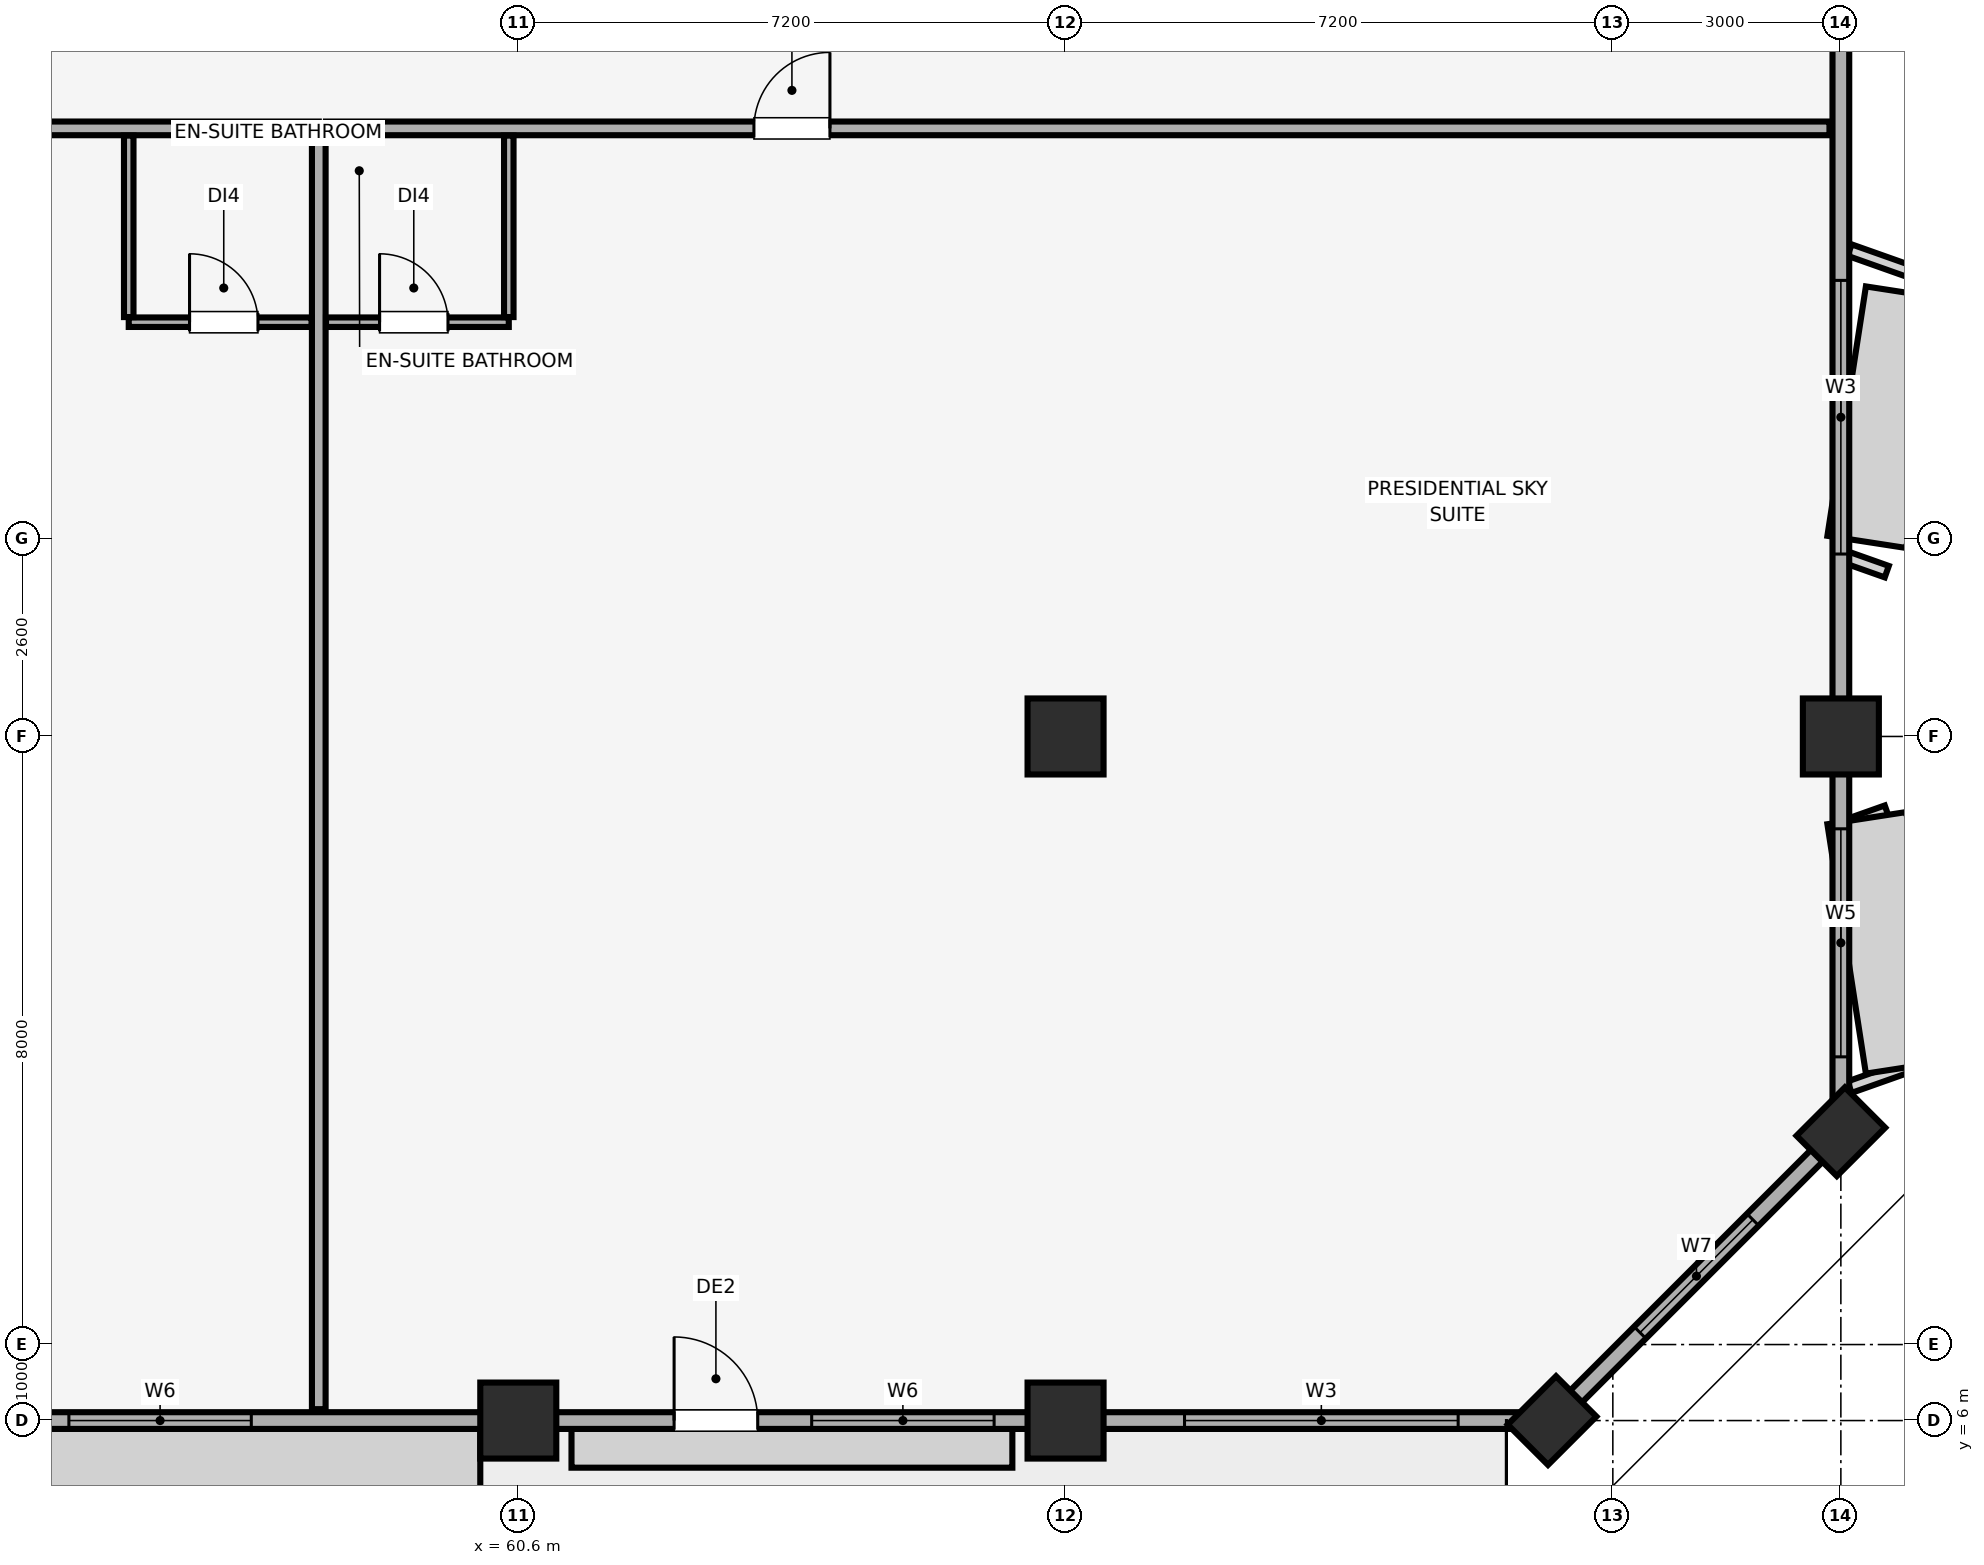
"""IFC4 building model, lengths in metres.
Left out: names, types, materials, properties, quantities, classifications, styles, units other than length and angle.
Written with IfcOpenShell. Run it as: python <this file> out.ifc"""

import sys

from ifc_helpers import new_model, si_unit, direction, frame, frame_2d, origin, origin_2d, place, context, subcontext, project, spatial, rectangle, extrude, element, fill, save


model = new_model("IFC4")
c1 = context("Model", 3, precision=1e-05, world=origin(), true_north=direction((0.0, 1.0)))
c2 = subcontext(c1, "Body", "Model", "MODEL_VIEW")
j1 = project(units=[si_unit("LENGTHUNIT", "METRE"), si_unit("PLANEANGLEUNIT", "RADIAN")], contexts=[c1])
p1 = place(None, origin())
s1 = spatial("IfcSite", under=j1, at=p1, CompositionType="ELEMENT")
p2 = place(p1, origin())
s2 = spatial("IfcBuilding", under=s1, at=p2, CompositionType="ELEMENT")
p3 = place(p2, frame((0.0, 0.0, 276.55)))
s3 = spatial("IfcBuildingStorey", under=s2, at=p3, CompositionType="ELEMENT", Elevation=276.55)
for number, where, z_axis, x_axis in (
    (1, (60.6, 6.0, 0.0), (0.0, 0.0, 1.0), (1.0, 0.0, 0.0)),
    (2, (67.8, 6.0, 0.0), (0.0, 0.0, 1.0), (1.0, 0.0, 0.0)),
    (3, (78.0, 15.0, 0.0), (0.0, 0.0, 1.0), (1.0, 0.0, 0.0)),
):
    element("IfcColumn", number, at=place(p3, frame(where, z_axis=z_axis, x_axis=x_axis)), inside=s3, PredefinedType="COLUMN", context=c2, shape_type="SweptSolid", body=[
        extrude(rectangle(XDim=1.0, YDim=1.0, at=origin_2d()), origin(), (0.0, 0.0, 1.0), 3.6),
    ])
for number, where, z_axis, x_axis in (
    (4, (74.2, 6.0, 0.0), (0.0, 0.0, 1.0), (0.707, 0.707, 0.0)),
    (5, (78.0, 9.8, 0.0), (0.0, 0.0, 1.0), (0.707, 0.707, 0.0)),
):
    element("IfcColumn", number, at=place(p3, frame(where, z_axis=z_axis, x_axis=x_axis)), inside=s3, PredefinedType="PILASTER", context=c2, shape_type="SweptSolid", body=[
        extrude(rectangle(XDim=0.9, YDim=0.75, at=origin_2d()), origin(), (0.0, 0.0, 1.0), 3.6),
    ])
p4 = place(p3, frame((67.8, 15.0, 0.0), z_axis=(0.0, 0.0, 1.0), x_axis=(1.0, 0.0, 0.0)))
e6 = element("IfcColumn", 6, at=p4, inside=s3, PredefinedType="COLUMN", context=c2, shape_type="SweptSolid", body=[
    extrude(rectangle(XDim=1.0, YDim=1.0, at=origin_2d()), origin(), (0.0, 0.0, 1.0), 3.6),
])
p5 = place(p3, frame((9.8, 6.0, 0.0), z_axis=(0.0, 0.0, 1.0), x_axis=(1.0, 0.0, 0.0)))
e7 = element("IfcWall", 7, at=p5, inside=s3, PredefinedType="SOLIDWALL", context=c2, shape_type="SweptSolid", body=[
    extrude(rectangle(XDim=64.4, YDim=0.22, at=frame_2d((32.2, 0.0))), origin(), (0.0, 0.0, 1.0), 2.8),
])
p6 = place(p5, frame((10.45, 0.0, 0.0)))
e8 = element("IfcOpeningElement", 8, at=p6, cuts=e7, PredefinedType="OPENING", context=c2, shape_type="SweptSolid", body=[
    extrude(rectangle(XDim=1.1, YDim=2.15, at=frame_2d((0.55, 1.075))), frame((0.0, 0.12, 0.0), z_axis=(0.0, -1.0, 0.0), x_axis=(1.0, 0.0, 0.0)), (0.0, 0.0, 1.0), 0.24),
])
p7 = place(p5, frame((24.45, 0.0, 0.0)))
e9 = element("IfcOpeningElement", 9, at=p7, cuts=e7, PredefinedType="OPENING", context=c2, shape_type="SweptSolid", body=[
    extrude(rectangle(XDim=1.1, YDim=2.15, at=frame_2d((0.55, 1.075))), frame((0.0, 0.12, 0.0), z_axis=(0.0, -1.0, 0.0), x_axis=(1.0, 0.0, 0.0)), (0.0, 0.0, 1.0), 0.24),
])
p8 = place(p5, frame((52.85, 0.0, 0.0)))
e10 = element("IfcOpeningElement", 10, at=p8, cuts=e7, PredefinedType="OPENING", context=c2, shape_type="SweptSolid", body=[
    extrude(rectangle(XDim=1.1, YDim=2.15, at=frame_2d((0.55, 1.075))), frame((0.0, 0.12, 0.0), z_axis=(0.0, -1.0, 0.0), x_axis=(1.0, 0.0, 0.0)), (0.0, 0.0, 1.0), 0.24),
])
p9 = place(p5, frame((1.235, 0.0, 0.85)))
e11 = element("IfcOpeningElement", 11, at=p9, cuts=e7, PredefinedType="OPENING", context=c2, shape_type="SweptSolid", body=[
    extrude(rectangle(XDim=3.6, YDim=1.75, at=frame_2d((1.8, 0.875))), frame((0.0, 0.12, 0.0), z_axis=(0.0, -1.0, 0.0), x_axis=(1.0, 0.0, 0.0)), (0.0, 0.0, 1.0), 0.24),
])
p10 = place(p5, frame((7.34, 0.0, 0.85)))
e12 = element("IfcOpeningElement", 12, at=p10, cuts=e7, PredefinedType="OPENING", context=c2, shape_type="SweptSolid", body=[
    extrude(rectangle(XDim=2.4, YDim=1.5, at=frame_2d((1.2, 0.75))), frame((0.0, 0.12, 0.0), z_axis=(0.0, -1.0, 0.0), x_axis=(1.0, 0.0, 0.0)), (0.0, 0.0, 1.0), 0.24),
])
p11 = place(p5, frame((17.113, 0.0, 0.85)))
e13 = element("IfcOpeningElement", 13, at=p11, cuts=e7, PredefinedType="OPENING", context=c2, shape_type="SweptSolid", body=[
    extrude(rectangle(XDim=2.4, YDim=1.5, at=frame_2d((1.2, 0.75))), frame((0.0, 0.12, 0.0), z_axis=(0.0, -1.0, 0.0), x_axis=(1.0, 0.0, 0.0)), (0.0, 0.0, 1.0), 0.24),
])
p12 = place(p5, frame((21.99, 0.0, 0.85)))
e14 = element("IfcOpeningElement", 14, at=p12, cuts=e7, PredefinedType="OPENING", context=c2, shape_type="SweptSolid", body=[
    extrude(rectangle(XDim=1.5, YDim=1.4, at=frame_2d((0.75, 0.7))), frame((0.0, 0.12, 0.0), z_axis=(0.0, -1.0, 0.0), x_axis=(1.0, 0.0, 0.0)), (0.0, 0.0, 1.0), 0.24),
])
p13 = place(p5, frame((29.1, 0.0, 0.85)))
e15 = element("IfcOpeningElement", 15, at=p13, cuts=e7, PredefinedType="OPENING", context=c2, shape_type="SweptSolid", body=[
    extrude(rectangle(XDim=2.4, YDim=1.5, at=frame_2d((1.2, 0.75))), frame((0.0, 0.12, 0.0), z_axis=(0.0, -1.0, 0.0), x_axis=(1.0, 0.0, 0.0)), (0.0, 0.0, 1.0), 0.24),
])
p14 = place(p5, frame((32.9, 0.0, 0.85)))
e16 = element("IfcOpeningElement", 16, at=p14, cuts=e7, PredefinedType="OPENING", context=c2, shape_type="SweptSolid", body=[
    extrude(rectangle(XDim=2.4, YDim=1.5, at=frame_2d((1.2, 0.75))), frame((0.0, 0.12, 0.0), z_axis=(0.0, -1.0, 0.0), x_axis=(1.0, 0.0, 0.0)), (0.0, 0.0, 1.0), 0.24),
])
p15 = place(p5, frame((38.2, 0.0, 0.85)))
e17 = element("IfcOpeningElement", 17, at=p15, cuts=e7, PredefinedType="OPENING", context=c2, shape_type="SweptSolid", body=[
    extrude(rectangle(XDim=3.6, YDim=1.75, at=frame_2d((1.8, 0.875))), frame((0.0, 0.12, 0.0), z_axis=(0.0, -1.0, 0.0), x_axis=(1.0, 0.0, 0.0)), (0.0, 0.0, 1.0), 0.24),
])
p16 = place(p5, frame((44.887, 0.0, 0.85)))
e18 = element("IfcOpeningElement", 18, at=p16, cuts=e7, PredefinedType="OPENING", context=c2, shape_type="SweptSolid", body=[
    extrude(rectangle(XDim=2.4, YDim=1.5, at=frame_2d((1.2, 0.75))), frame((0.0, 0.12, 0.0), z_axis=(0.0, -1.0, 0.0), x_axis=(1.0, 0.0, 0.0)), (0.0, 0.0, 1.0), 0.24),
])
p17 = place(p5, frame((54.66, 0.0, 0.85)))
e19 = element("IfcOpeningElement", 19, at=p17, cuts=e7, PredefinedType="OPENING", context=c2, shape_type="SweptSolid", body=[
    extrude(rectangle(XDim=2.4, YDim=1.5, at=frame_2d((1.2, 0.75))), frame((0.0, 0.12, 0.0), z_axis=(0.0, -1.0, 0.0), x_axis=(1.0, 0.0, 0.0)), (0.0, 0.0, 1.0), 0.24),
])
p18 = place(p5, frame((59.565, 0.0, 0.85)))
e20 = element("IfcOpeningElement", 20, at=p18, cuts=e7, PredefinedType="OPENING", context=c2, shape_type="SweptSolid", body=[
    extrude(rectangle(XDim=3.6, YDim=1.75, at=frame_2d((1.8, 0.875))), frame((0.0, 0.12, 0.0), z_axis=(0.0, -1.0, 0.0), x_axis=(1.0, 0.0, 0.0)), (0.0, 0.0, 1.0), 0.24),
])
p19 = place(p3, frame((74.2, 6.0, 0.0), z_axis=(0.0, 0.0, 1.0), x_axis=(0.707106781187, 0.707106781187, 0.0)))
e21 = element("IfcWall", 21, at=p19, inside=s3, PredefinedType="SOLIDWALL", context=c2, shape_type="SweptSolid", body=[
    extrude(rectangle(XDim=5.374, YDim=0.22, at=frame_2d((2.687, 0.0))), origin(), (0.0, 0.0, 1.0), 2.8),
])
p20 = place(p19, frame((1.637, 0.0, 0.85)))
e22 = element("IfcOpeningElement", 22, at=p20, cuts=e21, PredefinedType="OPENING", context=c2, shape_type="SweptSolid", body=[
    extrude(rectangle(XDim=2.1, YDim=1.6, at=frame_2d((1.05, 0.8))), frame((0.0, 0.12, 0.0), z_axis=(0.0, -1.0, 0.0), x_axis=(1.0, 0.0, 0.0)), (0.0, 0.0, 1.0), 0.24),
])
p21 = place(p3, frame((78.0, 9.8, 0.0), z_axis=(0.0, 0.0, 1.0), x_axis=(0.0, 1.0, 0.0)))
e23 = element("IfcWall", 23, at=p21, inside=s3, PredefinedType="SOLIDWALL", context=c2, shape_type="SweptSolid", body=[
    extrude(rectangle(XDim=35.4, YDim=0.22, at=frame_2d((17.7, 0.0))), origin(), (0.0, 0.0, 1.0), 2.8),
])
p22 = place(p21, frame((0.985, 0.0, 0.85)))
e24 = element("IfcOpeningElement", 24, at=p22, cuts=e23, PredefinedType="OPENING", context=c2, shape_type="SweptSolid", body=[
    extrude(rectangle(XDim=3.0, YDim=1.5, at=frame_2d((1.5, 0.75))), frame((0.0, 0.12, 0.0), z_axis=(0.0, -1.0, 0.0), x_axis=(1.0, 0.0, 0.0)), (0.0, 0.0, 1.0), 0.24),
])
p23 = place(p21, frame((7.6, 0.0, 0.85)))
e25 = element("IfcOpeningElement", 25, at=p23, cuts=e23, PredefinedType="OPENING", context=c2, shape_type="SweptSolid", body=[
    extrude(rectangle(XDim=3.6, YDim=1.65, at=frame_2d((1.8, 0.825))), frame((0.0, 0.12, 0.0), z_axis=(0.0, -1.0, 0.0), x_axis=(1.0, 0.0, 0.0)), (0.0, 0.0, 1.0), 0.24),
])
p24 = place(p21, frame((16.0, 0.0, 0.85)))
e26 = element("IfcOpeningElement", 26, at=p24, cuts=e23, PredefinedType="OPENING", context=c2, shape_type="SweptSolid", body=[
    extrude(rectangle(XDim=2.4, YDim=1.5, at=frame_2d((1.2, 0.75))), frame((0.0, 0.12, 0.0), z_axis=(0.0, -1.0, 0.0), x_axis=(1.0, 0.0, 0.0)), (0.0, 0.0, 1.0), 0.24),
])
p25 = place(p21, frame((20.815, 0.0, 0.85)))
e27 = element("IfcOpeningElement", 27, at=p25, cuts=e23, PredefinedType="OPENING", context=c2, shape_type="SweptSolid", body=[
    extrude(rectangle(XDim=3.0, YDim=1.5, at=frame_2d((1.5, 0.75))), frame((0.0, 0.12, 0.0), z_axis=(0.0, -1.0, 0.0), x_axis=(1.0, 0.0, 0.0)), (0.0, 0.0, 1.0), 0.24),
])
p26 = place(p21, frame((25.585, 0.0, 0.85)))
e28 = element("IfcOpeningElement", 28, at=p26, cuts=e23, PredefinedType="OPENING", context=c2, shape_type="SweptSolid", body=[
    extrude(rectangle(XDim=3.0, YDim=1.5, at=frame_2d((1.5, 0.75))), frame((0.0, 0.12, 0.0), z_axis=(0.0, -1.0, 0.0), x_axis=(1.0, 0.0, 0.0)), (0.0, 0.0, 1.0), 0.24),
])
p27 = place(p21, frame((30.915, 0.0, 0.85)))
e29 = element("IfcOpeningElement", 29, at=p27, cuts=e23, PredefinedType="OPENING", context=c2, shape_type="SweptSolid", body=[
    extrude(rectangle(XDim=3.6, YDim=1.65, at=frame_2d((1.8, 0.825))), frame((0.0, 0.12, 0.0), z_axis=(0.0, -1.0, 0.0), x_axis=(1.0, 0.0, 0.0)), (0.0, 0.0, 1.0), 0.24),
])
p28 = place(p3, frame((42.095, 23.0, 0.0), z_axis=(0.0, 0.0, 1.0), x_axis=(1.0, 0.0, 0.0)))
e30 = element("IfcWall", 30, at=p28, inside=s3, PredefinedType="PARTITIONING", context=c2, shape_type="SweptSolid", body=[
    extrude(rectangle(XDim=15.88, YDim=0.18, at=frame_2d((7.94, 0.0))), origin(), (0.0, 0.0, 1.0), 3.6),
])
p29 = place(p28, frame((7.205, 0.0, 0.0)))
e31 = element("IfcOpeningElement", 31, at=p29, cuts=e30, PredefinedType="OPENING", context=c2, shape_type="SweptSolid", body=[
    extrude(rectangle(XDim=1.0, YDim=2.15, at=frame_2d((0.5, 1.075))), frame((0.0, 0.1, 0.0), z_axis=(0.0, -1.0, 0.0), x_axis=(1.0, 0.0, 0.0)), (0.0, 0.0, 1.0), 0.2),
])
p30 = place(p3, frame((57.975, 6.15, 0.0), z_axis=(0.0, 0.0, 1.0), x_axis=(0.0, 1.0, 0.0)))
e32 = element("IfcWall", 32, at=p30, inside=s3, PredefinedType="PARTITIONING", context=c2, shape_type="SweptSolid", body=[
    extrude(rectangle(XDim=16.755, YDim=0.18, at=frame_2d((8.377, 0.0))), origin(), (0.0, 0.0, 1.0), 3.6),
])
p31 = place(p3, frame((55.475, 20.45, 0.0), z_axis=(0.0, 0.0, 1.0), x_axis=(1.0, 0.0, 0.0)))
e33 = element("IfcWall", 33, at=p31, inside=s3, PredefinedType="PARTITIONING", context=c2, shape_type="SweptSolid", body=[
    extrude(rectangle(XDim=2.405, YDim=0.125, at=frame_2d((1.202, 0.0))), origin(), (0.0, 0.0, 1.0), 3.6),
])
p32 = place(p31, frame((0.8, 0.0, 0.0)))
e34 = element("IfcOpeningElement", 34, at=p32, cuts=e33, PredefinedType="OPENING", context=c2, shape_type="SweptSolid", body=[
    extrude(rectangle(XDim=0.9, YDim=2.1, at=frame_2d((0.45, 1.05))), frame((0.0, 0.073, 0.0), z_axis=(0.0, -1.0, 0.0), x_axis=(1.0, 0.0, 0.0)), (0.0, 0.0, 1.0), 0.145),
])
p33 = place(p3, frame((55.475, 20.518, 0.0), z_axis=(0.0, 0.0, 1.0), x_axis=(0.0, 1.0, 0.0)))
e35 = element("IfcWall", 35, at=p33, inside=s3, PredefinedType="PARTITIONING", context=c2, shape_type="SweptSolid", body=[
    extrude(rectangle(XDim=2.387, YDim=0.125, at=frame_2d((1.194, 0.0))), origin(), (0.0, 0.0, 1.0), 3.6),
])
p34 = place(p3, frame((58.07, 23.0, 0.0), z_axis=(0.0, 0.0, 1.0), x_axis=(1.0, 0.0, 0.0)))
e36 = element("IfcWall", 36, at=p34, inside=s3, PredefinedType="PARTITIONING", context=c2, shape_type="SweptSolid", body=[
    extrude(rectangle(XDim=19.78, YDim=0.18, at=frame_2d((9.89, 0.0))), origin(), (0.0, 0.0, 1.0), 3.6),
])
p35 = place(p34, frame((5.63, 0.0, 0.0)))
e37 = element("IfcOpeningElement", 37, at=p35, cuts=e36, PredefinedType="OPENING", context=c2, shape_type="SweptSolid", body=[
    extrude(rectangle(XDim=1.0, YDim=2.15, at=frame_2d((0.5, 1.075))), frame((0.0, 0.1, 0.0), z_axis=(0.0, -1.0, 0.0), x_axis=(1.0, 0.0, 0.0)), (0.0, 0.0, 1.0), 0.2),
])
p36 = place(p3, frame((58.07, 20.45, 0.0), z_axis=(0.0, 0.0, 1.0), x_axis=(1.0, 0.0, 0.0)))
e38 = element("IfcWall", 38, at=p36, inside=s3, PredefinedType="PARTITIONING", context=c2, shape_type="SweptSolid", body=[
    extrude(rectangle(XDim=2.405, YDim=0.125, at=frame_2d((1.203, 0.0))), origin(), (0.0, 0.0, 1.0), 3.6),
])
p37 = place(p36, frame((0.705, 0.0, 0.0)))
e39 = element("IfcOpeningElement", 39, at=p37, cuts=e38, PredefinedType="OPENING", context=c2, shape_type="SweptSolid", body=[
    extrude(rectangle(XDim=0.9, YDim=2.1, at=frame_2d((0.45, 1.05))), frame((0.0, 0.073, 0.0), z_axis=(0.0, -1.0, 0.0), x_axis=(1.0, 0.0, 0.0)), (0.0, 0.0, 1.0), 0.145),
])
p38 = place(p3, frame((60.475, 20.518, 0.0), z_axis=(0.0, 0.0, 1.0), x_axis=(0.0, 1.0, 0.0)))
e40 = element("IfcWall", 40, at=p38, inside=s3, PredefinedType="PARTITIONING", context=c2, shape_type="SweptSolid", body=[
    extrude(rectangle(XDim=2.387, YDim=0.125, at=frame_2d((1.194, 0.0))), origin(), (0.0, 0.0, 1.0), 3.1),
])
p39 = place(p20, origin())
e41 = element("IfcWindow", 41, at=p39, inside=s3, PartitioningType="SINGLE_PANEL", PredefinedType="WINDOW", context=c2, shape_type="SweptSolid", body=[
    extrude(rectangle(XDim=2.1, YDim=1.6, at=frame_2d((1.05, 0.8))), frame((0.0, 0.03, 0.0), z_axis=(0.0, -1.0, 0.0), x_axis=(1.0, 0.0, 0.0)), (0.0, 0.0, 1.0), 0.06),
])
fill(e22, e41)
p40 = place(p8, origin())
e42 = element("IfcDoor", 42, at=p40, inside=s3, OperationType="SINGLE_SWING_LEFT", PredefinedType="DOOR", context=c2, shape_type="SweptSolid", body=[
    extrude(rectangle(XDim=1.1, YDim=2.15, at=frame_2d((0.55, 1.075))), frame((0.0, 0.025, 0.0), z_axis=(0.0, -1.0, 0.0), x_axis=(1.0, 0.0, 0.0)), (0.0, 0.0, 1.0), 0.05),
])
fill(e10, e42)
p41 = place(p16, origin())
e43 = element("IfcWindow", 43, at=p41, inside=s3, PartitioningType="SINGLE_PANEL", PredefinedType="WINDOW", context=c2, shape_type="SweptSolid", body=[
    extrude(rectangle(XDim=2.4, YDim=1.5, at=frame_2d((1.2, 0.75))), frame((0.0, 0.03, 0.0), z_axis=(0.0, -1.0, 0.0), x_axis=(1.0, 0.0, 0.0)), (0.0, 0.0, 1.0), 0.06),
])
fill(e18, e43)
p42 = place(p17, origin())
e44 = element("IfcWindow", 44, at=p42, inside=s3, PartitioningType="SINGLE_PANEL", PredefinedType="WINDOW", context=c2, shape_type="SweptSolid", body=[
    extrude(rectangle(XDim=2.4, YDim=1.5, at=frame_2d((1.2, 0.75))), frame((0.0, 0.03, 0.0), z_axis=(0.0, -1.0, 0.0), x_axis=(1.0, 0.0, 0.0)), (0.0, 0.0, 1.0), 0.06),
])
fill(e19, e44)
p43 = place(p18, origin())
e45 = element("IfcWindow", 45, at=p43, inside=s3, PartitioningType="SINGLE_PANEL", PredefinedType="WINDOW", context=c2, shape_type="SweptSolid", body=[
    extrude(rectangle(XDim=3.6, YDim=1.75, at=frame_2d((1.8, 0.875))), frame((0.0, 0.03, 0.0), z_axis=(0.0, -1.0, 0.0), x_axis=(1.0, 0.0, 0.0)), (0.0, 0.0, 1.0), 0.06),
])
fill(e20, e45)
p44 = place(p22, origin())
e46 = element("IfcWindow", 46, at=p44, inside=s3, PartitioningType="SINGLE_PANEL", PredefinedType="WINDOW", context=c2, shape_type="SweptSolid", body=[
    extrude(rectangle(XDim=3.0, YDim=1.5, at=frame_2d((1.5, 0.75))), frame((0.0, 0.03, 0.0), z_axis=(0.0, -1.0, 0.0), x_axis=(1.0, 0.0, 0.0)), (0.0, 0.0, 1.0), 0.06),
])
fill(e24, e46)
p45 = place(p23, origin())
e47 = element("IfcWindow", 47, at=p45, inside=s3, PartitioningType="SINGLE_PANEL", PredefinedType="WINDOW", context=c2, shape_type="SweptSolid", body=[
    extrude(rectangle(XDim=3.6, YDim=1.65, at=frame_2d((1.8, 0.825))), frame((0.0, 0.03, 0.0), z_axis=(0.0, -1.0, 0.0), x_axis=(1.0, 0.0, 0.0)), (0.0, 0.0, 1.0), 0.06),
])
fill(e25, e47)
p46 = place(p32, origin())
e48 = element("IfcDoor", 48, at=p46, inside=s3, OperationType="SINGLE_SWING_LEFT", PredefinedType="DOOR", context=c2, shape_type="SweptSolid", body=[
    extrude(rectangle(XDim=0.9, YDim=2.1, at=frame_2d((0.45, 1.05))), frame((0.0, 0.025, 0.0), z_axis=(0.0, -1.0, 0.0), x_axis=(1.0, 0.0, 0.0)), (0.0, 0.0, 1.0), 0.05),
])
fill(e34, e48)
p47 = place(p35, origin())
e49 = element("IfcDoor", 49, at=p47, inside=s3, OperationType="SINGLE_SWING_RIGHT", PredefinedType="DOOR", context=c2, shape_type="SweptSolid", body=[
    extrude(rectangle(XDim=1.0, YDim=2.15, at=frame_2d((0.5, 1.075))), frame((0.0, 0.025, 0.0), z_axis=(0.0, -1.0, 0.0), x_axis=(1.0, 0.0, 0.0)), (0.0, 0.0, 1.0), 0.05),
])
fill(e37, e49)
p48 = place(p37, origin())
e50 = element("IfcDoor", 50, at=p48, inside=s3, OperationType="SINGLE_SWING_LEFT", PredefinedType="DOOR", context=c2, shape_type="SweptSolid", body=[
    extrude(rectangle(XDim=0.9, YDim=2.1, at=frame_2d((0.45, 1.05))), frame((0.0, 0.025, 0.0), z_axis=(0.0, -1.0, 0.0), x_axis=(1.0, 0.0, 0.0)), (0.0, 0.0, 1.0), 0.05),
])
fill(e39, e50)
save(model, sys.argv[1])
